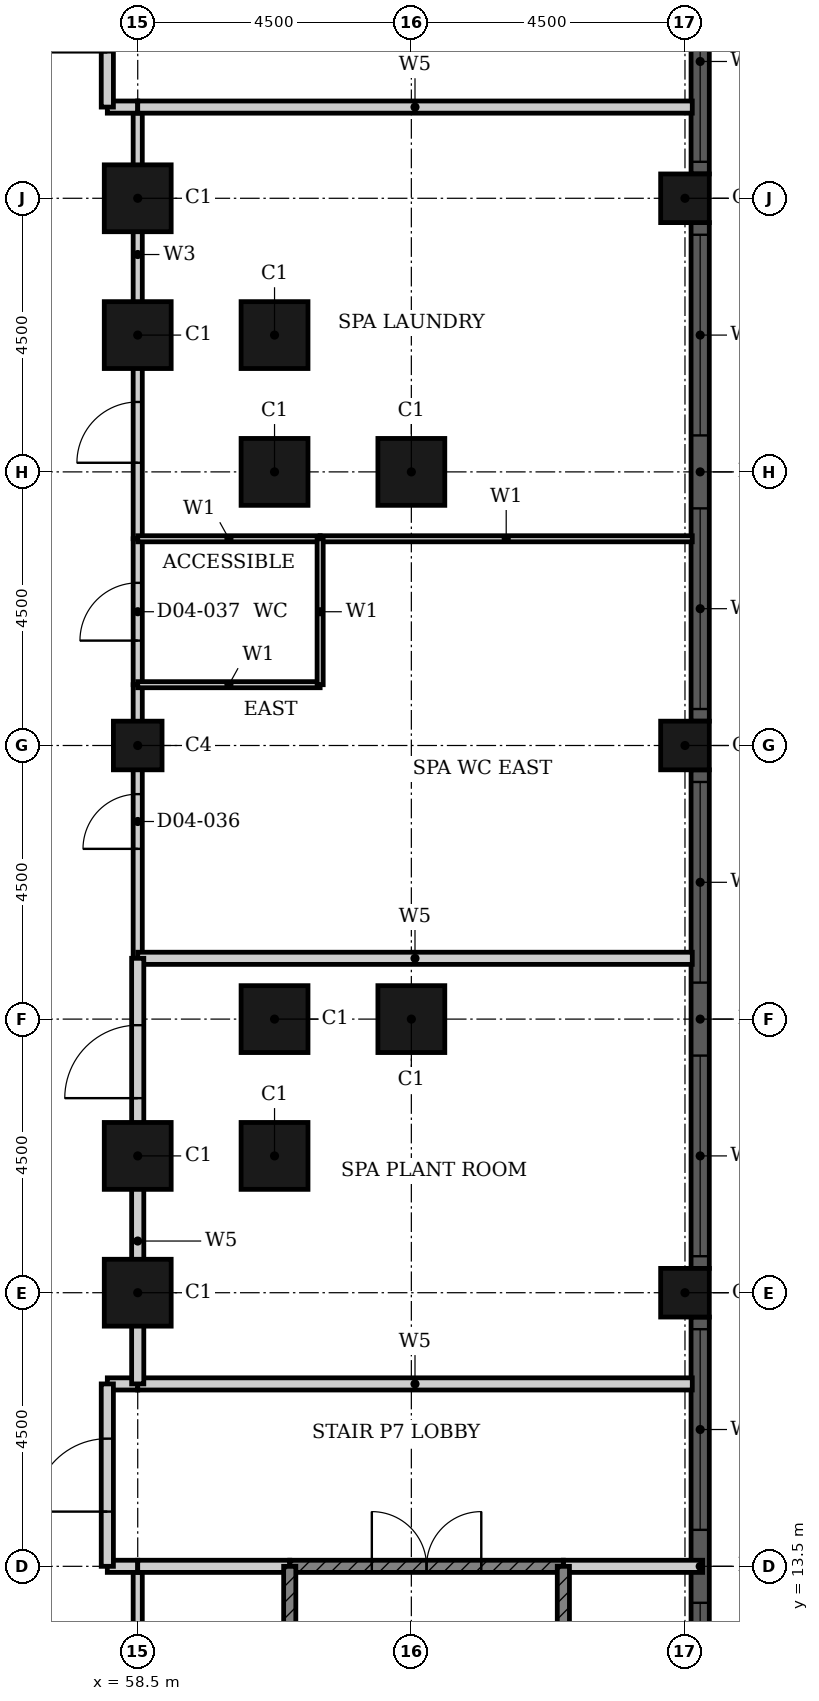
"""IFC4 building model, lengths in metres.
Left out: names, types, materials, properties, quantities, classifications, styles, units other than length and angle.
Written with IfcOpenShell. Run it as: python <this file> out.ifc"""

import sys

from ifc_helpers import new_model, si_unit, direction, frame, frame_2d, origin, origin_2d, place, context, subcontext, project, spatial, rectangle, hollow_rectangle, extrude, element, fill, save


model = new_model("IFC4")
c1 = context("Model", 3, precision=1e-05, world=origin(), true_north=direction((0.0, 1.0)))
c2 = subcontext(c1, "Body", "Model", "MODEL_VIEW")
j1 = project(units=[si_unit("LENGTHUNIT", "METRE"), si_unit("PLANEANGLEUNIT", "RADIAN")], contexts=[c1])
p1 = place(None, origin())
s1 = spatial("IfcSite", under=j1, at=p1, CompositionType="ELEMENT")
p2 = place(p1, origin())
s2 = spatial("IfcBuilding", under=s1, at=p2, CompositionType="ELEMENT")
p3 = place(p2, frame((0.0, 0.0, 24.0)))
s3 = spatial("IfcBuildingStorey", under=s2, at=p3, CompositionType="ELEMENT", Elevation=24.0)
for number, where, z_axis, x_axis in (
    (1, (58.5, 18.0, 0.0), (0.0, 0.0, 1.0), (1.0, 0.0, 0.0)),
    (2, (58.5, 20.25, 0.0), (0.0, 0.0, 1.0), (1.0, 0.0, 0.0)),
    (3, (60.75, 20.25, 0.0), (0.0, 0.0, 1.0), (1.0, 0.0, 0.0)),
    (4, (60.75, 22.5, 0.0), (0.0, 0.0, 1.0), (1.0, 0.0, 0.0)),
    (5, (63.0, 22.5, 0.0), (0.0, 0.0, 1.0), (1.0, 0.0, 0.0)),
    (6, (63.0, 31.5, 0.0), (0.0, 0.0, 1.0), (1.0, 0.0, 0.0)),
    (7, (60.75, 31.5, 0.0), (0.0, 0.0, 1.0), (1.0, 0.0, 0.0)),
    (8, (60.75, 33.75, 0.0), (0.0, 0.0, 1.0), (1.0, 0.0, 0.0)),
    (9, (58.5, 33.75, 0.0), (0.0, 0.0, 1.0), (1.0, 0.0, 0.0)),
    (10, (58.5, 36.0, 0.0), (0.0, 0.0, 1.0), (1.0, 0.0, 0.0)),
):
    element("IfcColumn", number, at=place(p3, frame(where, z_axis=z_axis, x_axis=x_axis)), inside=s3, PredefinedType="COLUMN", context=c2, shape_type="SweptSolid", body=[
        extrude(hollow_rectangle(XDim=1.1, YDim=1.1, WallThickness=0.036, at=origin_2d()), origin(), (0.0, 0.0, 1.0), 4.8),
    ])
for number, where, z_axis, x_axis in (
    (11, (67.5, 18.0, 0.0), (0.0, 0.0, 1.0), (1.0, 0.0, 0.0)),
    (12, (67.5, 27.0, 0.0), (0.0, 0.0, 1.0), (1.0, 0.0, 0.0)),
    (13, (67.5, 36.0, 0.0), (0.0, 0.0, 1.0), (1.0, 0.0, 0.0)),
    (14, (58.5, 27.0, 0.0), (0.0, 0.0, 1.0), (1.0, 0.0, 0.0)),
):
    element("IfcColumn", number, at=place(p3, frame(where, z_axis=z_axis, x_axis=x_axis)), inside=s3, PredefinedType="COLUMN", context=c2, shape_type="SweptSolid", body=[
        extrude(hollow_rectangle(XDim=0.8, YDim=0.8, WallThickness=0.025, at=origin_2d()), origin(), (0.0, 0.0, 1.0), 4.8),
    ])
p4 = place(p3, frame((67.75, 9.4, 0.0), z_axis=(0.0, 0.0, 1.0), x_axis=(0.0, 1.0, 0.0)))
e15 = element("IfcWall", 15, at=p4, inside=s3, PredefinedType="SOLIDWALL", context=c2, shape_type="SweptSolid", body=[
    extrude(rectangle(XDim=8.2, YDim=0.3, at=frame_2d((4.1, 0.0))), origin(), (0.0, 0.0, 1.0), 4.8),
])
p5 = place(p4, frame((0.2, 0.0, 0.9)))
e16 = element("IfcOpeningElement", 16, at=p5, cuts=e15, PredefinedType="OPENING", context=c2, shape_type="SweptSolid", body=[
    extrude(rectangle(XDim=3.3, YDim=2.9, at=frame_2d((1.65, 1.45))), frame((0.0, 0.16, 0.0), z_axis=(0.0, -1.0, 0.0), x_axis=(1.0, 0.0, 0.0)), (0.0, 0.0, 1.0), 0.32),
])
p6 = place(p4, frame((4.7, 0.0, 0.9)))
e17 = element("IfcOpeningElement", 17, at=p6, cuts=e15, PredefinedType="OPENING", context=c2, shape_type="SweptSolid", body=[
    extrude(rectangle(XDim=3.3, YDim=2.9, at=frame_2d((1.65, 1.45))), frame((0.0, 0.16, 0.0), z_axis=(0.0, -1.0, 0.0), x_axis=(1.0, 0.0, 0.0)), (0.0, 0.0, 1.0), 0.32),
])
p7 = place(p3, frame((67.75, 18.4, 0.0), z_axis=(0.0, 0.0, 1.0), x_axis=(0.0, 1.0, 0.0)))
e18 = element("IfcWall", 18, at=p7, inside=s3, PredefinedType="SOLIDWALL", context=c2, shape_type="SweptSolid", body=[
    extrude(rectangle(XDim=8.2, YDim=0.3, at=frame_2d((4.1, 0.0))), origin(), (0.0, 0.0, 1.0), 4.8),
])
p8 = place(p7, frame((0.2, 0.0, 0.9)))
e19 = element("IfcOpeningElement", 19, at=p8, cuts=e18, PredefinedType="OPENING", context=c2, shape_type="SweptSolid", body=[
    extrude(rectangle(XDim=3.3, YDim=2.9, at=frame_2d((1.65, 1.45))), frame((0.0, 0.16, 0.0), z_axis=(0.0, -1.0, 0.0), x_axis=(1.0, 0.0, 0.0)), (0.0, 0.0, 1.0), 0.32),
])
p9 = place(p7, frame((4.7, 0.0, 0.9)))
e20 = element("IfcOpeningElement", 20, at=p9, cuts=e18, PredefinedType="OPENING", context=c2, shape_type="SweptSolid", body=[
    extrude(rectangle(XDim=3.3, YDim=2.9, at=frame_2d((1.65, 1.45))), frame((0.0, 0.16, 0.0), z_axis=(0.0, -1.0, 0.0), x_axis=(1.0, 0.0, 0.0)), (0.0, 0.0, 1.0), 0.32),
])
p10 = place(p3, frame((67.75, 27.4, 0.0), z_axis=(0.0, 0.0, 1.0), x_axis=(0.0, 1.0, 0.0)))
e21 = element("IfcWall", 21, at=p10, inside=s3, PredefinedType="SOLIDWALL", context=c2, shape_type="SweptSolid", body=[
    extrude(rectangle(XDim=8.2, YDim=0.3, at=frame_2d((4.1, 0.0))), origin(), (0.0, 0.0, 1.0), 4.8),
])
p11 = place(p10, frame((0.2, 0.0, 0.9)))
e22 = element("IfcOpeningElement", 22, at=p11, cuts=e21, PredefinedType="OPENING", context=c2, shape_type="SweptSolid", body=[
    extrude(rectangle(XDim=3.3, YDim=2.9, at=frame_2d((1.65, 1.45))), frame((0.0, 0.16, 0.0), z_axis=(0.0, -1.0, 0.0), x_axis=(1.0, 0.0, 0.0)), (0.0, 0.0, 1.0), 0.32),
])
p12 = place(p10, frame((4.7, 0.0, 0.9)))
e23 = element("IfcOpeningElement", 23, at=p12, cuts=e21, PredefinedType="OPENING", context=c2, shape_type="SweptSolid", body=[
    extrude(rectangle(XDim=3.3, YDim=2.9, at=frame_2d((1.65, 1.45))), frame((0.0, 0.16, 0.0), z_axis=(0.0, -1.0, 0.0), x_axis=(1.0, 0.0, 0.0)), (0.0, 0.0, 1.0), 0.32),
])
p13 = place(p3, frame((67.75, 36.4, 0.0), z_axis=(0.0, 0.0, 1.0), x_axis=(0.0, 1.0, 0.0)))
e24 = element("IfcWall", 24, at=p13, inside=s3, PredefinedType="SOLIDWALL", context=c2, shape_type="SweptSolid", body=[
    extrude(rectangle(XDim=8.2, YDim=0.3, at=frame_2d((4.1, 0.0))), origin(), (0.0, 0.0, 1.0), 4.8),
])
p14 = place(p13, frame((0.2, 0.0, 0.9)))
e25 = element("IfcOpeningElement", 25, at=p14, cuts=e24, PredefinedType="OPENING", context=c2, shape_type="SweptSolid", body=[
    extrude(rectangle(XDim=3.3, YDim=2.9, at=frame_2d((1.65, 1.45))), frame((0.0, 0.16, 0.0), z_axis=(0.0, -1.0, 0.0), x_axis=(1.0, 0.0, 0.0)), (0.0, 0.0, 1.0), 0.32),
])
p15 = place(p13, frame((4.7, 0.0, 0.9)))
e26 = element("IfcOpeningElement", 26, at=p15, cuts=e24, PredefinedType="OPENING", context=c2, shape_type="SweptSolid", body=[
    extrude(rectangle(XDim=3.3, YDim=2.9, at=frame_2d((1.65, 1.45))), frame((0.0, 0.16, 0.0), z_axis=(0.0, -1.0, 0.0), x_axis=(1.0, 0.0, 0.0)), (0.0, 0.0, 1.0), 0.32),
])
p16 = place(p3, frame((58.5, 9.0, 0.0), z_axis=(0.0, 0.0, 1.0), x_axis=(0.0, 1.0, 0.0)))
e27 = element("IfcWall", 27, at=p16, inside=s3, PredefinedType="PARTITIONING", context=c2, shape_type="SweptSolid", body=[
    extrude(rectangle(XDim=4.5, YDim=0.15, at=frame_2d((2.25, 0.0))), origin(), (0.0, 0.0, 1.0), 4.45),
])
p17 = place(p16, frame((1.8, 0.0, 0.0)))
e28 = element("IfcOpeningElement", 28, at=p17, cuts=e27, PredefinedType="OPENING", context=c2, shape_type="SweptSolid", body=[
    extrude(rectangle(XDim=0.9, YDim=2.1, at=frame_2d((0.45, 1.05))), frame((0.0, 0.085, 0.0), z_axis=(0.0, -1.0, 0.0), x_axis=(1.0, 0.0, 0.0)), (0.0, 0.0, 1.0), 0.17),
])
p18 = place(p3, frame((58.5, 23.5, 0.0), z_axis=(0.0, 0.0, 1.0), x_axis=(0.0, 1.0, 0.0)))
e29 = element("IfcWall", 29, at=p18, inside=s3, PredefinedType="PARTITIONING", context=c2, shape_type="SweptSolid", body=[
    extrude(rectangle(XDim=4.5, YDim=0.15, at=frame_2d((2.25, 0.0))), origin(), (0.0, 0.0, 1.0), 4.45),
])
p19 = place(p18, frame((1.8, 0.0, 0.0)))
e30 = element("IfcOpeningElement", 30, at=p19, cuts=e29, PredefinedType="OPENING", context=c2, shape_type="SweptSolid", body=[
    extrude(rectangle(XDim=0.9, YDim=2.1, at=frame_2d((0.45, 1.05))), frame((0.0, 0.085, 0.0), z_axis=(0.0, -1.0, 0.0), x_axis=(1.0, 0.0, 0.0)), (0.0, 0.0, 1.0), 0.17),
])
p20 = place(p3, frame((58.5, 28.0, 0.0), z_axis=(0.0, 0.0, 1.0), x_axis=(0.0, 1.0, 0.0)))
e31 = element("IfcWall", 31, at=p20, inside=s3, PredefinedType="PARTITIONING", context=c2, shape_type="SweptSolid", body=[
    extrude(rectangle(XDim=2.4, YDim=0.15, at=frame_2d((1.2, 0.0))), origin(), (0.0, 0.0, 1.0), 4.45),
])
p21 = place(p20, frame((0.725, 0.0, 0.0)))
e32 = element("IfcOpeningElement", 32, at=p21, cuts=e31, PredefinedType="OPENING", context=c2, shape_type="SweptSolid", body=[
    extrude(rectangle(XDim=0.95, YDim=2.1, at=frame_2d((0.475, 1.05))), frame((0.0, 0.085, 0.0), z_axis=(0.0, -1.0, 0.0), x_axis=(1.0, 0.0, 0.0)), (0.0, 0.0, 1.0), 0.17),
])
p22 = place(p3, frame((58.5, 30.4, 0.0), z_axis=(0.0, 0.0, 1.0), x_axis=(0.0, 1.0, 0.0)))
e33 = element("IfcWall", 33, at=p22, inside=s3, PredefinedType="PARTITIONING", context=c2, shape_type="SweptSolid", body=[
    extrude(rectangle(XDim=7.1, YDim=0.15, at=frame_2d((3.55, 0.0))), origin(), (0.0, 0.0, 1.0), 4.45),
])
p23 = place(p22, frame((1.25, 0.0, 0.0)))
e34 = element("IfcOpeningElement", 34, at=p23, cuts=e33, PredefinedType="OPENING", context=c2, shape_type="SweptSolid", body=[
    extrude(rectangle(XDim=1.0, YDim=2.1, at=frame_2d((0.5, 1.05))), frame((0.0, 0.085, 0.0), z_axis=(0.0, -1.0, 0.0), x_axis=(1.0, 0.0, 0.0)), (0.0, 0.0, 1.0), 0.17),
])
p24 = place(p3, frame((58.5, 28.0, 0.0), z_axis=(0.0, 0.0, 1.0), x_axis=(1.0, 0.0, 0.0)))
e35 = element("IfcWall", 35, at=p24, inside=s3, PredefinedType="PARTITIONING", context=c2, shape_type="SweptSolid", body=[
    extrude(rectangle(XDim=3.0, YDim=0.1, at=frame_2d((1.5, 0.0))), origin(), (0.0, 0.0, 1.0), 4.45),
])
p25 = place(p3, frame((61.5, 30.4, 0.0), z_axis=(0.0, 0.0, 1.0), x_axis=(1.0, 0.0, 0.0)))
e36 = element("IfcWall", 36, at=p25, inside=s3, PredefinedType="PARTITIONING", context=c2, shape_type="SweptSolid", body=[
    extrude(rectangle(XDim=6.12, YDim=0.1, at=frame_2d((3.06, 0.0))), origin(), (0.0, 0.0, 1.0), 4.45),
])
p26 = place(p3, frame((58.5, 30.4, 0.0), z_axis=(0.0, 0.0, 1.0), x_axis=(1.0, 0.0, 0.0)))
e37 = element("IfcWall", 37, at=p26, inside=s3, PredefinedType="PARTITIONING", context=c2, shape_type="SweptSolid", body=[
    extrude(rectangle(XDim=3.0, YDim=0.1, at=frame_2d((1.5, 0.0))), origin(), (0.0, 0.0, 1.0), 4.45),
])
p27 = place(p3, frame((61.5, 28.0, 0.0), z_axis=(0.0, 0.0, 1.0), x_axis=(0.0, 1.0, 0.0)))
e38 = element("IfcWall", 38, at=p27, inside=s3, PredefinedType="PARTITIONING", context=c2, shape_type="SweptSolid", body=[
    extrude(rectangle(XDim=2.4, YDim=0.1, at=frame_2d((1.2, 0.0))), origin(), (0.0, 0.0, 1.0), 4.45),
])
p28 = place(p3, frame((58.0, 13.5, 0.0), z_axis=(0.0, 0.0, 1.0), x_axis=(1.0, 0.0, 0.0)))
e39 = element("IfcWall", 39, at=p28, inside=s3, PredefinedType="PARTITIONING", context=c2, shape_type="SweptSolid", body=[
    extrude(rectangle(XDim=0.5, YDim=0.2, at=frame_2d((0.25, 0.0))), origin(), (0.0, 0.0, 1.0), 4.45),
])
p29 = place(p3, frame((58.5, 13.5, 0.0), z_axis=(0.0, 0.0, 1.0), x_axis=(1.0, 0.0, 0.0)))
e40 = element("IfcWall", 40, at=p29, inside=s3, PredefinedType="PARTITIONING", context=c2, shape_type="SweptSolid", body=[
    extrude(rectangle(XDim=2.5, YDim=0.2, at=frame_2d((1.25, 0.0))), origin(), (0.0, 0.0, 1.0), 4.45),
])
p30 = place(p3, frame((65.5, 13.5, 0.0), z_axis=(0.0, 0.0, 1.0), x_axis=(1.0, 0.0, 0.0)))
e41 = element("IfcWall", 41, at=p30, inside=s3, PredefinedType="PARTITIONING", context=c2, shape_type="SweptSolid", body=[
    extrude(rectangle(XDim=2.29, YDim=0.2, at=frame_2d((1.145, 0.0))), origin(), (0.0, 0.0, 1.0), 4.45),
])
p31 = place(p3, frame((58.0, 16.5, 0.0), z_axis=(0.0, 0.0, 1.0), x_axis=(1.0, 0.0, 0.0)))
e42 = element("IfcWall", 42, at=p31, inside=s3, PredefinedType="PARTITIONING", context=c2, shape_type="SweptSolid", body=[
    extrude(rectangle(XDim=0.5, YDim=0.2, at=frame_2d((0.25, 0.0))), origin(), (0.0, 0.0, 1.0), 4.45),
])
for number, where, z_axis, x_axis in (
    (43, (58.5, 16.5, 0.0), (0.0, 0.0, 1.0), (1.0, 0.0, 0.0)),
    (44, (58.5, 23.5, 0.0), (0.0, 0.0, 1.0), (1.0, 0.0, 0.0)),
):
    element("IfcWall", number, at=place(p3, frame(where, z_axis=z_axis, x_axis=x_axis)), inside=s3, PredefinedType="PARTITIONING", context=c2, shape_type="SweptSolid", body=[
        extrude(rectangle(XDim=9.12, YDim=0.2, at=frame_2d((4.56, 0.0))), origin(), (0.0, 0.0, 1.0), 4.45),
    ])
p32 = place(p3, frame((58.0, 37.5, 0.0), z_axis=(0.0, 0.0, 1.0), x_axis=(1.0, 0.0, 0.0)))
e45 = element("IfcWall", 45, at=p32, inside=s3, PredefinedType="PARTITIONING", context=c2, shape_type="SweptSolid", body=[
    extrude(rectangle(XDim=0.5, YDim=0.2, at=frame_2d((0.25, 0.0))), origin(), (0.0, 0.0, 1.0), 4.45),
])
p33 = place(p3, frame((58.5, 37.5, 0.0), z_axis=(0.0, 0.0, 1.0), x_axis=(1.0, 0.0, 0.0)))
e46 = element("IfcWall", 46, at=p33, inside=s3, PredefinedType="PARTITIONING", context=c2, shape_type="SweptSolid", body=[
    extrude(rectangle(XDim=9.12, YDim=0.2, at=frame_2d((4.56, 0.0))), origin(), (0.0, 0.0, 1.0), 4.45),
])
p34 = place(p3, frame((58.0, 37.5, 0.0), z_axis=(0.0, 0.0, 1.0), x_axis=(0.0, 1.0, 0.0)))
e47 = element("IfcWall", 47, at=p34, inside=s3, PredefinedType="PARTITIONING", context=c2, shape_type="SweptSolid", body=[
    extrude(rectangle(XDim=3.0, YDim=0.2, at=frame_2d((1.5, 0.0))), origin(), (0.0, 0.0, 1.0), 4.45),
])
p35 = place(p34, frame((0.9, 0.0, 0.0)))
e48 = element("IfcOpeningElement", 48, at=p35, cuts=e47, PredefinedType="OPENING", context=c2, shape_type="SweptSolid", body=[
    extrude(rectangle(XDim=1.2, YDim=2.1, at=frame_2d((0.6, 1.05))), frame((0.0, 0.11, 0.0), z_axis=(0.0, -1.0, 0.0), x_axis=(1.0, 0.0, 0.0)), (0.0, 0.0, 1.0), 0.22),
])
p36 = place(p3, frame((58.0, 13.5, 0.0), z_axis=(0.0, 0.0, 1.0), x_axis=(0.0, 1.0, 0.0)))
e49 = element("IfcWall", 49, at=p36, inside=s3, PredefinedType="PARTITIONING", context=c2, shape_type="SweptSolid", body=[
    extrude(rectangle(XDim=3.0, YDim=0.2, at=frame_2d((1.5, 0.0))), origin(), (0.0, 0.0, 1.0), 4.45),
])
p37 = place(p36, frame((0.9, 0.0, 0.0)))
e50 = element("IfcOpeningElement", 50, at=p37, cuts=e49, PredefinedType="OPENING", context=c2, shape_type="SweptSolid", body=[
    extrude(rectangle(XDim=1.2, YDim=2.1, at=frame_2d((0.6, 1.05))), frame((0.0, 0.11, 0.0), z_axis=(0.0, -1.0, 0.0), x_axis=(1.0, 0.0, 0.0)), (0.0, 0.0, 1.0), 0.22),
])
p38 = place(p3, frame((58.5, 16.5, 0.0), z_axis=(0.0, 0.0, 1.0), x_axis=(0.0, 1.0, 0.0)))
e51 = element("IfcWall", 51, at=p38, inside=s3, PredefinedType="PARTITIONING", context=c2, shape_type="SweptSolid", body=[
    extrude(rectangle(XDim=7.0, YDim=0.2, at=frame_2d((3.5, 0.0))), origin(), (0.0, 0.0, 1.0), 4.45),
])
p39 = place(p38, frame((4.7, 0.0, 0.0)))
e52 = element("IfcOpeningElement", 52, at=p39, cuts=e51, PredefinedType="OPENING", context=c2, shape_type="SweptSolid", body=[
    extrude(rectangle(XDim=1.2, YDim=2.1, at=frame_2d((0.6, 1.05))), frame((0.0, 0.11, 0.0), z_axis=(0.0, -1.0, 0.0), x_axis=(1.0, 0.0, 0.0)), (0.0, 0.0, 1.0), 0.22),
])
p40 = place(p3, frame((61.0, 13.5, 0.0), z_axis=(0.0, 0.0, 1.0), x_axis=(1.0, 0.0, 0.0)))
e53 = element("IfcWall", 53, at=p40, inside=s3, PredefinedType="SHEAR", context=c2, shape_type="SweptSolid", body=[
    extrude(rectangle(XDim=4.5, YDim=0.2, at=frame_2d((2.25, 0.0))), origin(), (0.0, 0.0, 1.0), 4.45),
])
p41 = place(p40, frame((1.35, 0.0, 0.0)))
e54 = element("IfcOpeningElement", 54, at=p41, cuts=e53, PredefinedType="OPENING", context=c2, shape_type="SweptSolid", body=[
    extrude(rectangle(XDim=1.8, YDim=2.1, at=frame_2d((0.9, 1.05))), frame((0.0, 0.11, 0.0), z_axis=(0.0, -1.0, 0.0), x_axis=(1.0, 0.0, 0.0)), (0.0, 0.0, 1.0), 0.22),
])
for number, where, z_axis, x_axis in (
    (55, (61.0, 5.05, 0.0), (0.0, 0.0, 1.0), (0.0, 1.0, 0.0)),
    (56, (65.5, 5.05, 0.0), (0.0, 0.0, 1.0), (0.0, 1.0, 0.0)),
):
    element("IfcWall", number, at=place(p3, frame(where, z_axis=z_axis, x_axis=x_axis)), inside=s3, PredefinedType="SHEAR", context=c2, shape_type="SweptSolid", body=[
        extrude(rectangle(XDim=8.45, YDim=0.2, at=frame_2d((4.225, 0.0))), origin(), (0.0, 0.0, 1.0), 4.45),
    ])
p42 = place(p5, origin())
e57 = element("IfcWindow", 57, at=p42, inside=s3, PartitioningType="SINGLE_PANEL", PredefinedType="WINDOW", context=c2, shape_type="SweptSolid", body=[
    extrude(rectangle(XDim=3.3, YDim=2.9, at=frame_2d((1.65, 1.45))), frame((0.0, 0.03, 0.0), z_axis=(0.0, -1.0, 0.0), x_axis=(1.0, 0.0, 0.0)), (0.0, 0.0, 1.0), 0.06),
])
fill(e16, e57)
p43 = place(p6, origin())
e58 = element("IfcWindow", 58, at=p43, inside=s3, PartitioningType="SINGLE_PANEL", PredefinedType="WINDOW", context=c2, shape_type="SweptSolid", body=[
    extrude(rectangle(XDim=3.3, YDim=2.9, at=frame_2d((1.65, 1.45))), frame((0.0, 0.03, 0.0), z_axis=(0.0, -1.0, 0.0), x_axis=(1.0, 0.0, 0.0)), (0.0, 0.0, 1.0), 0.06),
])
fill(e17, e58)
p44 = place(p8, origin())
e59 = element("IfcWindow", 59, at=p44, inside=s3, PartitioningType="SINGLE_PANEL", PredefinedType="WINDOW", context=c2, shape_type="SweptSolid", body=[
    extrude(rectangle(XDim=3.3, YDim=2.9, at=frame_2d((1.65, 1.45))), frame((0.0, 0.03, 0.0), z_axis=(0.0, -1.0, 0.0), x_axis=(1.0, 0.0, 0.0)), (0.0, 0.0, 1.0), 0.06),
])
fill(e19, e59)
p45 = place(p9, origin())
e60 = element("IfcWindow", 60, at=p45, inside=s3, PartitioningType="SINGLE_PANEL", PredefinedType="WINDOW", context=c2, shape_type="SweptSolid", body=[
    extrude(rectangle(XDim=3.3, YDim=2.9, at=frame_2d((1.65, 1.45))), frame((0.0, 0.03, 0.0), z_axis=(0.0, -1.0, 0.0), x_axis=(1.0, 0.0, 0.0)), (0.0, 0.0, 1.0), 0.06),
])
fill(e20, e60)
p46 = place(p11, origin())
e61 = element("IfcWindow", 61, at=p46, inside=s3, PartitioningType="SINGLE_PANEL", PredefinedType="WINDOW", context=c2, shape_type="SweptSolid", body=[
    extrude(rectangle(XDim=3.3, YDim=2.9, at=frame_2d((1.65, 1.45))), frame((0.0, 0.03, 0.0), z_axis=(0.0, -1.0, 0.0), x_axis=(1.0, 0.0, 0.0)), (0.0, 0.0, 1.0), 0.06),
])
fill(e22, e61)
p47 = place(p12, origin())
e62 = element("IfcWindow", 62, at=p47, inside=s3, PartitioningType="SINGLE_PANEL", PredefinedType="WINDOW", context=c2, shape_type="SweptSolid", body=[
    extrude(rectangle(XDim=3.3, YDim=2.9, at=frame_2d((1.65, 1.45))), frame((0.0, 0.03, 0.0), z_axis=(0.0, -1.0, 0.0), x_axis=(1.0, 0.0, 0.0)), (0.0, 0.0, 1.0), 0.06),
])
fill(e23, e62)
p48 = place(p14, origin())
e63 = element("IfcWindow", 63, at=p48, inside=s3, PartitioningType="SINGLE_PANEL", PredefinedType="WINDOW", context=c2, shape_type="SweptSolid", body=[
    extrude(rectangle(XDim=3.3, YDim=2.9, at=frame_2d((1.65, 1.45))), frame((0.0, 0.03, 0.0), z_axis=(0.0, -1.0, 0.0), x_axis=(1.0, 0.0, 0.0)), (0.0, 0.0, 1.0), 0.06),
])
fill(e25, e63)
p49 = place(p37, origin())
e64 = element("IfcDoor", 64, at=p49, inside=s3, OperationType="SINGLE_SWING_LEFT", PredefinedType="DOOR", context=c2, shape_type="SweptSolid", body=[
    extrude(rectangle(XDim=1.2, YDim=2.1, at=frame_2d((0.6, 1.05))), frame((0.0, 0.025, 0.0), z_axis=(0.0, -1.0, 0.0), x_axis=(1.0, 0.0, 0.0)), (0.0, 0.0, 1.0), 0.05),
])
fill(e50, e64)
p50 = place(p41, origin())
e65 = element("IfcDoor", 65, at=p50, inside=s3, OperationType="DOUBLE_DOOR_SINGLE_SWING", PredefinedType="DOOR", context=c2, shape_type="SweptSolid", body=[
    extrude(rectangle(XDim=1.8, YDim=2.1, at=frame_2d((0.9, 1.05))), frame((0.0, 0.025, 0.0), z_axis=(0.0, -1.0, 0.0), x_axis=(1.0, 0.0, 0.0)), (0.0, 0.0, 1.0), 0.05),
])
fill(e54, e65)
p51 = place(p39, origin())
e66 = element("IfcDoor", 66, at=p51, inside=s3, OperationType="SINGLE_SWING_RIGHT", PredefinedType="DOOR", context=c2, shape_type="SweptSolid", body=[
    extrude(rectangle(XDim=1.2, YDim=2.1, at=frame_2d((0.6, 1.05))), frame((0.0, 0.025, 0.0), z_axis=(0.0, -1.0, 0.0), x_axis=(1.0, 0.0, 0.0)), (0.0, 0.0, 1.0), 0.05),
])
fill(e52, e66)
p52 = place(p19, origin())
e67 = element("IfcDoor", 67, at=p52, inside=s3, OperationType="SINGLE_SWING_RIGHT", PredefinedType="DOOR", context=c2, shape_type="SweptSolid", body=[
    extrude(rectangle(XDim=0.9, YDim=2.1, at=frame_2d((0.45, 1.05))), frame((0.0, 0.025, 0.0), z_axis=(0.0, -1.0, 0.0), x_axis=(1.0, 0.0, 0.0)), (0.0, 0.0, 1.0), 0.05),
])
fill(e30, e67)
p53 = place(p21, origin())
e68 = element("IfcDoor", 68, at=p53, inside=s3, OperationType="SINGLE_SWING_LEFT", PredefinedType="DOOR", context=c2, shape_type="SweptSolid", body=[
    extrude(rectangle(XDim=0.95, YDim=2.1, at=frame_2d((0.475, 1.05))), frame((0.0, 0.025, 0.0), z_axis=(0.0, -1.0, 0.0), x_axis=(1.0, 0.0, 0.0)), (0.0, 0.0, 1.0), 0.05),
])
fill(e32, e68)
p54 = place(p23, origin())
e69 = element("IfcDoor", 69, at=p54, inside=s3, OperationType="SINGLE_SWING_LEFT", PredefinedType="DOOR", context=c2, shape_type="SweptSolid", body=[
    extrude(rectangle(XDim=1.0, YDim=2.1, at=frame_2d((0.5, 1.05))), frame((0.0, 0.025, 0.0), z_axis=(0.0, -1.0, 0.0), x_axis=(1.0, 0.0, 0.0)), (0.0, 0.0, 1.0), 0.05),
])
fill(e34, e69)
save(model, sys.argv[1])
